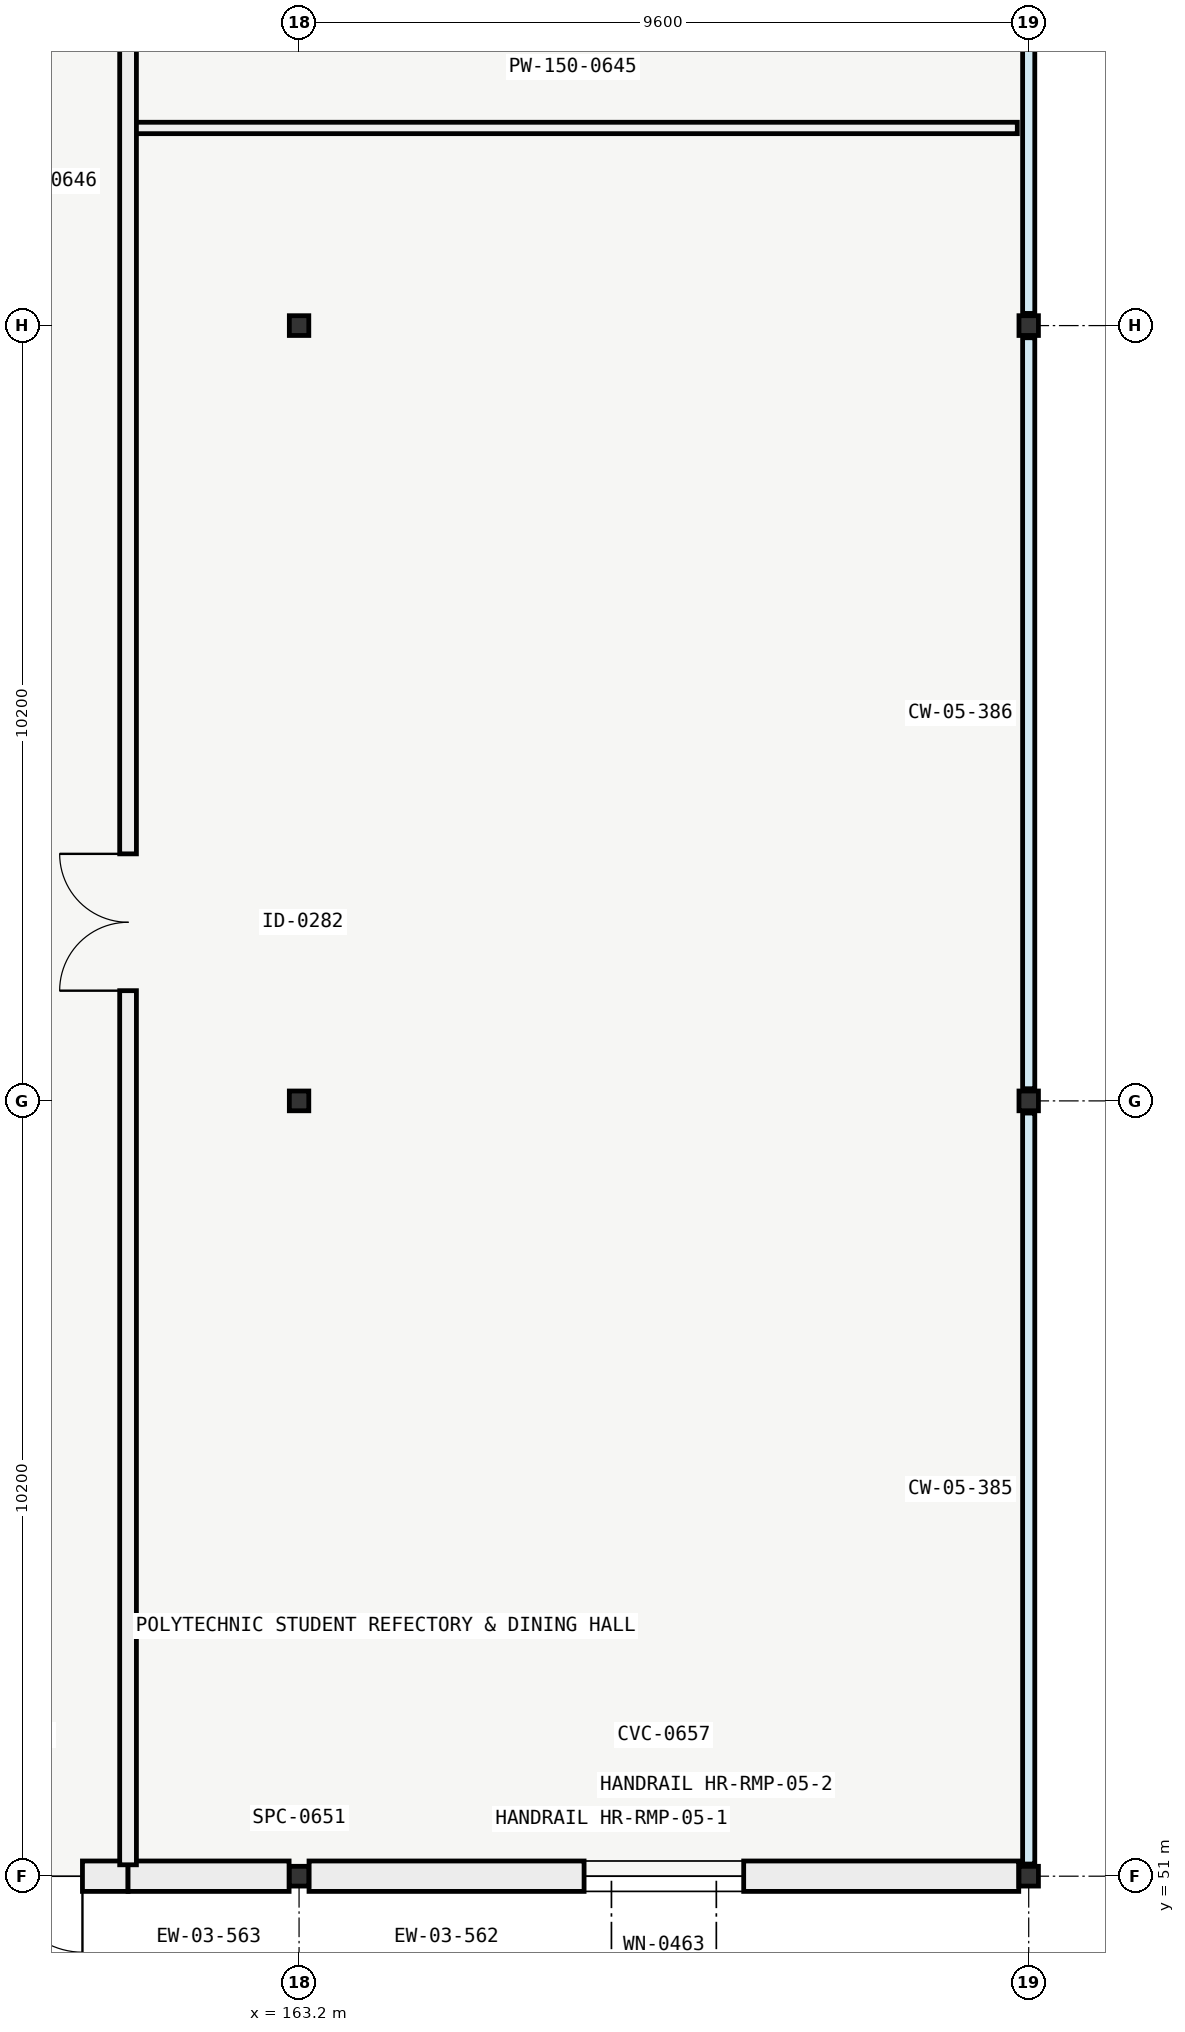
"""IFC4 building model, lengths in metres.
Left out: names, types, materials, properties, quantities, classifications, styles, units other than length and angle.
Written with IfcOpenShell. Run it as: python <this file> out.ifc"""

import sys

from ifc_helpers import new_model, si_unit, direction, frame, frame_2d, origin, origin_2d, place, context, subcontext, project, spatial, rectangle, i_section, extrude, element, fill, save


model = new_model("IFC4")
c1 = context("Model", 3, precision=1e-05, world=origin(), true_north=direction((0.0, 1.0)))
c2 = subcontext(c1, "Body", "Model", "MODEL_VIEW")
j1 = project(units=[si_unit("LENGTHUNIT", "METRE"), si_unit("PLANEANGLEUNIT", "RADIAN")], contexts=[c1])
p1 = place(None, origin())
s1 = spatial("IfcSite", under=j1, at=p1, CompositionType="ELEMENT")
p2 = place(p1, origin())
s2 = spatial("IfcBuilding", under=s1, at=p2, CompositionType="ELEMENT")
p3 = place(p2, origin())
s3 = spatial("IfcBuildingStorey", under=s2, at=p3, CompositionType="ELEMENT", Elevation=0.0)
for number, where, z_axis, x_axis in (
    (1, (163.2, 51.0, -0.4), (0.0, 0.0, 1.0), (1.0, 0.0, 0.0)),
    (2, (163.2, 61.2, -0.4), (0.0, 0.0, 1.0), (1.0, 0.0, 0.0)),
    (3, (163.2, 71.4, -0.4), (0.0, 0.0, 1.0), (1.0, 0.0, 0.0)),
    (4, (172.8, 51.0, -0.4), (0.0, 0.0, 1.0), (1.0, 0.0, 0.0)),
    (5, (172.8, 61.2, -0.4), (0.0, 0.0, 1.0), (1.0, 0.0, 0.0)),
    (6, (172.8, 71.4, -0.4), (0.0, 0.0, 1.0), (1.0, 0.0, 0.0)),
):
    element("IfcColumn", number, at=place(p3, frame(where, z_axis=z_axis, x_axis=x_axis)), inside=s3, PredefinedType="COLUMN", context=c2, shape_type="SweptSolid", body=[
        extrude(i_section(OverallWidth=0.256, OverallDepth=0.26, WebThickness=0.01, FlangeThickness=0.017, FilletRadius=0.014, at=origin_2d()), origin(), (0.0, 0.0, 1.0), 5.8),
    ])
p4 = place(p3, frame((160.95, 51.0, 0.0), z_axis=(0.0, 0.0, 1.0), x_axis=(-1.0, 0.0, 0.0)))
e7 = element("IfcWall", 7, at=p4, inside=s3, PredefinedType="SOLIDWALL", context=c2, shape_type="SweptSolid", body=[
    extrude(rectangle(XDim=3.2, YDim=0.4, at=frame_2d((1.6, 0.0))), origin(), (0.0, 0.0, 1.0), 4.64),
])
p5 = place(p4, frame((0.6, 0.0, 0.0)))
e8 = element("IfcOpeningElement", 8, at=p5, cuts=e7, PredefinedType="OPENING", context=c2, shape_type="SweptSolid", body=[
    extrude(rectangle(XDim=2.0, YDim=2.4, at=frame_2d((1.0, 1.2))), frame((0.0, 0.21, 0.0), z_axis=(0.0, -1.0, 0.0), x_axis=(1.0, 0.0, 0.0)), (0.0, 0.0, 1.0), 0.42),
])
p6 = place(p3, frame((172.669, 51.0, 0.0), z_axis=(0.0, 0.0, 1.0), x_axis=(-1.0, 0.0, 0.0)))
e9 = element("IfcWall", 9, at=p6, inside=s3, PredefinedType="SOLIDWALL", context=c2, shape_type="SweptSolid", body=[
    extrude(rectangle(XDim=9.338, YDim=0.4, at=frame_2d((4.669, 0.0))), origin(), (0.0, 0.0, 1.0), 4.64),
])
p7 = place(p6, frame((3.619, 0.0, 0.85)))
e10 = element("IfcOpeningElement", 10, at=p7, cuts=e9, PredefinedType="OPENING", context=c2, shape_type="SweptSolid", body=[
    extrude(rectangle(XDim=2.1, YDim=2.4, at=frame_2d((1.05, 1.2))), frame((0.0, 0.21, 0.0), z_axis=(0.0, -1.0, 0.0), x_axis=(1.0, 0.0, 0.0)), (0.0, 0.0, 1.0), 0.42),
])
p8 = place(p3, frame((163.069, 51.0, 0.0), z_axis=(0.0, 0.0, 1.0), x_axis=(-1.0, 0.0, 0.0)))
e11 = element("IfcWall", 11, at=p8, inside=s3, PredefinedType="SOLIDWALL", context=c2, shape_type="SweptSolid", body=[
    extrude(rectangle(XDim=2.119, YDim=0.4, at=frame_2d((1.06, 0.0))), origin(), (0.0, 0.0, 1.0), 4.64),
])
p9 = place(p3, frame((160.95, 74.0, 0.0), z_axis=(0.0, 0.0, 1.0), x_axis=(1.0, 0.0, 0.0)))
e12 = element("IfcWall", 12, at=p9, inside=s3, PredefinedType="PARTITIONING", context=c2, shape_type="SweptSolid", body=[
    extrude(rectangle(XDim=11.7, YDim=0.15, at=frame_2d((5.85, 0.0))), origin(), (0.0, 0.0, 1.0), 4.694),
])
p10 = place(p3, frame((160.95, 51.15, 0.0), z_axis=(0.0, 0.0, 1.0), x_axis=(0.0, 1.0, 0.0)))
e13 = element("IfcWall", 13, at=p10, inside=s3, PredefinedType="PARTITIONING", context=c2, shape_type="SweptSolid", body=[
    extrude(rectangle(XDim=40.5, YDim=0.22, at=frame_2d((20.25, 0.0))), origin(), (0.0, 0.0, 1.0), 4.64),
])
p11 = place(p10, frame((11.5, 0.0, 0.0)))
e14 = element("IfcOpeningElement", 14, at=p11, cuts=e13, PredefinedType="OPENING", context=c2, shape_type="SweptSolid", body=[
    extrude(rectangle(XDim=1.8, YDim=2.2, at=frame_2d((0.9, 1.1))), frame((0.0, 0.12, 0.0), z_axis=(0.0, -1.0, 0.0), x_axis=(1.0, 0.0, 0.0)), (0.0, 0.0, 1.0), 0.24),
])
p12 = place(p10, frame((31.0, 0.0, 0.0)))
e15 = element("IfcOpeningElement", 15, at=p12, cuts=e13, PredefinedType="OPENING", context=c2, shape_type="SweptSolid", body=[
    extrude(rectangle(XDim=1.5, YDim=2.2, at=frame_2d((0.75, 1.1))), frame((0.0, 0.12, 0.0), z_axis=(0.0, -1.0, 0.0), x_axis=(1.0, 0.0, 0.0)), (0.0, 0.0, 1.0), 0.24),
])
p13 = place(p5, origin())
e16 = element("IfcDoor", 16, at=p13, inside=s3, OperationType="DOUBLE_DOOR_SINGLE_SWING", PredefinedType="DOOR", context=c2, shape_type="SweptSolid", body=[
    extrude(rectangle(XDim=2.0, YDim=2.4, at=frame_2d((1.0, 1.2))), frame((0.0, 0.025, 0.0), z_axis=(0.0, -1.0, 0.0), x_axis=(1.0, 0.0, 0.0)), (0.0, 0.0, 1.0), 0.05),
])
fill(e8, e16)
p14 = place(p7, origin())
e17 = element("IfcWindow", 17, at=p14, inside=s3, PartitioningType="SINGLE_PANEL", PredefinedType="WINDOW", context=c2, shape_type="SweptSolid", body=[
    extrude(rectangle(XDim=2.1, YDim=2.4, at=frame_2d((1.05, 1.2))), frame((0.0, 0.03, 0.0), z_axis=(0.0, -1.0, 0.0), x_axis=(1.0, 0.0, 0.0)), (0.0, 0.0, 1.0), 0.06),
])
fill(e10, e17)
p15 = place(p11, origin())
e18 = element("IfcDoor", 18, at=p15, inside=s3, OperationType="DOUBLE_DOOR_SINGLE_SWING", PredefinedType="DOOR", context=c2, shape_type="SweptSolid", body=[
    extrude(rectangle(XDim=1.8, YDim=2.2, at=frame_2d((0.9, 1.1))), frame((0.0, 0.025, 0.0), z_axis=(0.0, -1.0, 0.0), x_axis=(1.0, 0.0, 0.0)), (0.0, 0.0, 1.0), 0.05),
])
fill(e14, e18)
save(model, sys.argv[1])
